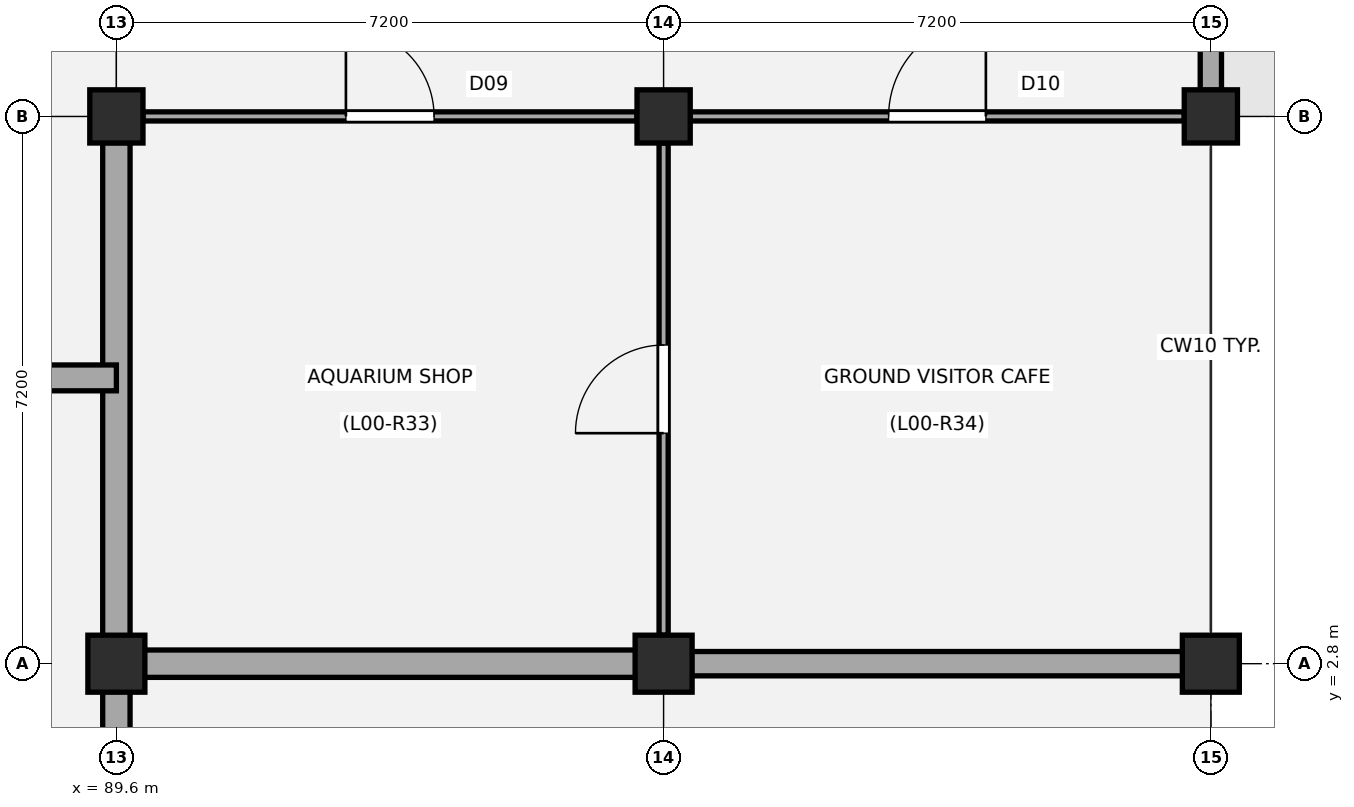
"""IFC4 building model, lengths in metres.
Left out: names, types, materials, properties, quantities, classifications, styles, units other than length and angle.
Written with IfcOpenShell. Run it as: python <this file> out.ifc"""

import sys

from ifc_helpers import new_model, si_unit, direction, frame, frame_2d, origin, origin_2d, place, context, subcontext, project, spatial, rectangle, circle, extrude, element, fill, save


model = new_model("IFC4")
c1 = context("Model", 3, precision=1e-05, world=origin(), true_north=direction((0.0, 1.0)))
c2 = subcontext(c1, "Body", "Model", "MODEL_VIEW")
j1 = project(units=[si_unit("LENGTHUNIT", "METRE"), si_unit("PLANEANGLEUNIT", "RADIAN")], contexts=[c1])
p1 = place(None, origin())
s1 = spatial("IfcSite", under=j1, at=p1, CompositionType="ELEMENT")
p2 = place(p1, origin())
s2 = spatial("IfcBuilding", under=s1, at=p2, CompositionType="ELEMENT")
p3 = place(p2, origin())
s3 = spatial("IfcBuildingStorey", under=s2, at=p3, CompositionType="ELEMENT", Elevation=0.0)
p4 = place(p3, frame((89.6, 2.8, -0.35), z_axis=(0.0, 0.0, 1.0), x_axis=(1.0, 0.0, 0.0)))
e1 = element("IfcColumn", 1, at=p4, inside=s3, PredefinedType="COLUMN", context=c2, shape_type="SweptSolid", body=[
    extrude(circle(Radius=0.375, at=origin_2d()), origin(), (0.0, 0.0, 1.0), 5.03),
])
p5 = place(p3, frame((89.6, 10.0, -0.35), z_axis=(0.0, 0.0, 1.0), x_axis=(1.0, 0.0, 0.0)))
e2 = element("IfcColumn", 2, at=p5, inside=s3, PredefinedType="COLUMN", context=c2, shape_type="SweptSolid", body=[
    extrude(rectangle(XDim=0.7, YDim=0.7, at=origin_2d()), origin(), (0.0, 0.0, 1.0), 5.03),
])
p6 = place(p3, frame((96.8, 2.8, -0.35), z_axis=(0.0, 0.0, 1.0), x_axis=(1.0, 0.0, 0.0)))
e3 = element("IfcColumn", 3, at=p6, inside=s3, PredefinedType="COLUMN", context=c2, shape_type="SweptSolid", body=[
    extrude(circle(Radius=0.375, at=origin_2d()), origin(), (0.0, 0.0, 1.0), 5.03),
])
p7 = place(p3, frame((96.8, 10.0, -0.35), z_axis=(0.0, 0.0, 1.0), x_axis=(1.0, 0.0, 0.0)))
e4 = element("IfcColumn", 4, at=p7, inside=s3, PredefinedType="COLUMN", context=c2, shape_type="SweptSolid", body=[
    extrude(rectangle(XDim=0.7, YDim=0.7, at=origin_2d()), origin(), (0.0, 0.0, 1.0), 5.03),
])
p8 = place(p3, frame((104.0, 2.8, -0.35), z_axis=(0.0, 0.0, 1.0), x_axis=(1.0, 0.0, 0.0)))
e5 = element("IfcColumn", 5, at=p8, inside=s3, PredefinedType="COLUMN", context=c2, shape_type="SweptSolid", body=[
    extrude(circle(Radius=0.375, at=origin_2d()), origin(), (0.0, 0.0, 1.0), 5.03),
])
p9 = place(p3, frame((104.0, 10.0, -0.35), z_axis=(0.0, 0.0, 1.0), x_axis=(1.0, 0.0, 0.0)))
e6 = element("IfcColumn", 6, at=p9, inside=s3, PredefinedType="COLUMN", context=c2, shape_type="SweptSolid", body=[
    extrude(rectangle(XDim=0.7, YDim=0.7, at=origin_2d()), origin(), (0.0, 0.0, 1.0), 5.03),
])
p10 = place(p3, frame((96.49, 2.8, 0.0), z_axis=(0.0, 0.0, 1.0), x_axis=(-1.0, 0.0, 0.0)))
e7 = element("IfcWall", 7, at=p10, inside=s3, PredefinedType="STANDARD", context=c2, shape_type="SweptSolid", body=[
    extrude(rectangle(XDim=6.58, YDim=0.36, at=frame_2d((3.29, 0.0))), origin(), (0.0, 0.0, 1.0), 3.67),
])
p11 = place(p3, frame((103.69, 2.8, 0.0), z_axis=(0.0, 0.0, 1.0), x_axis=(-1.0, 0.0, 0.0)))
e8 = element("IfcWall", 8, at=p11, inside=s3, PredefinedType="STANDARD", context=c2, shape_type="SweptSolid", body=[
    extrude(rectangle(XDim=6.58, YDim=0.32, at=frame_2d((3.29, 0.0))), origin(), (0.0, 0.0, 1.0), 3.67),
])
p12 = place(p3, frame((104.0, 16.855, 0.0), z_axis=(0.0, 0.0, 1.0), x_axis=(0.0, -1.0, 0.0)))
e9 = element("IfcWall", 9, at=p12, inside=s3, PredefinedType="STANDARD", context=c2, shape_type="SweptSolid", body=[
    extrude(rectangle(XDim=6.51, YDim=0.28, at=frame_2d((3.255, 0.0))), origin(), (0.0, 0.0, 1.0), 3.67),
])
p13 = place(p12, frame((2.235, 0.0, 0.0)))
e10 = element("IfcOpeningElement", 10, at=p13, cuts=e9, PredefinedType="OPENING", context=c2, shape_type="SweptSolid", body=[
    extrude(rectangle(XDim=2.04, YDim=2.32, at=frame_2d((1.02, 1.16))), frame((0.0, 0.15, 0.0), z_axis=(0.0, -1.0, 0.0), x_axis=(1.0, 0.0, 0.0)), (0.0, 0.0, 1.0), 0.3),
])
p14 = place(p3, frame((89.6, 1.56, 0.0), z_axis=(0.0, 0.0, 1.0), x_axis=(0.0, 1.0, 0.0)))
e11 = element("IfcWall", 11, at=p14, inside=s3, PredefinedType="STANDARD", context=c2, shape_type="SweptSolid", body=[
    extrude(rectangle(XDim=8.095, YDim=0.36, at=frame_2d((4.047, 0.0))), origin(), (0.0, 0.0, 1.0), 3.67),
])
p15 = place(p3, frame((88.2, 6.56, 0.0), z_axis=(0.0, 0.0, 1.0), x_axis=(1.0, 0.0, 0.0)))
e12 = element("IfcWall", 12, at=p15, inside=s3, PredefinedType="STANDARD", context=c2, shape_type="SweptSolid", body=[
    extrude(rectangle(XDim=1.4, YDim=0.34, at=frame_2d((0.7, 0.0))), origin(), (0.0, 0.0, 1.0), 8.87),
])
p16 = place(p3, frame((96.8, 3.175, 0.0), z_axis=(0.0, 0.0, 1.0), x_axis=(0.0, 1.0, 0.0)))
e13 = element("IfcWall", 13, at=p16, inside=s3, PredefinedType="PARTITIONING", context=c2, shape_type="SweptSolid", body=[
    extrude(rectangle(XDim=6.475, YDim=0.12, at=frame_2d((3.237, 0.0))), origin(), (0.0, 0.0, 1.0), 3.62),
])
p17 = place(p16, frame((2.657, 0.0, 0.0)))
e14 = element("IfcOpeningElement", 14, at=p17, cuts=e13, PredefinedType="OPENING", context=c2, shape_type="SweptSolid", body=[
    extrude(rectangle(XDim=1.16, YDim=2.18, at=frame_2d((0.58, 1.09))), frame((0.0, 0.07, 0.0), z_axis=(0.0, -1.0, 0.0), x_axis=(1.0, 0.0, 0.0)), (0.0, 0.0, 1.0), 0.14),
])
p18 = place(p3, frame((89.95, 10.0, 0.0), z_axis=(0.0, 0.0, 1.0), x_axis=(1.0, 0.0, 0.0)))
e15 = element("IfcWall", 15, at=p18, inside=s3, PredefinedType="PARTITIONING", context=c2, shape_type="SweptSolid", body=[
    extrude(rectangle(XDim=6.5, YDim=0.12, at=frame_2d((3.25, 0.0))), origin(), (0.0, 0.0, 1.0), 3.62),
])
p19 = place(p18, frame((2.67, 0.0, 0.0)))
e16 = element("IfcOpeningElement", 16, at=p19, cuts=e15, PredefinedType="OPENING", context=c2, shape_type="SweptSolid", body=[
    extrude(rectangle(XDim=1.16, YDim=2.18, at=frame_2d((0.58, 1.09))), frame((0.0, 0.07, 0.0), z_axis=(0.0, -1.0, 0.0), x_axis=(1.0, 0.0, 0.0)), (0.0, 0.0, 1.0), 0.14),
])
p20 = place(p3, frame((97.15, 10.0, 0.0), z_axis=(0.0, 0.0, 1.0), x_axis=(1.0, 0.0, 0.0)))
e17 = element("IfcWall", 17, at=p20, inside=s3, PredefinedType="PARTITIONING", context=c2, shape_type="SweptSolid", body=[
    extrude(rectangle(XDim=6.5, YDim=0.12, at=frame_2d((3.25, 0.0))), origin(), (0.0, 0.0, 1.0), 3.52),
])
p21 = place(p20, frame((2.61, 0.0, 0.0)))
e18 = element("IfcOpeningElement", 18, at=p21, cuts=e17, PredefinedType="OPENING", context=c2, shape_type="SweptSolid", body=[
    extrude(rectangle(XDim=1.28, YDim=2.2, at=frame_2d((0.64, 1.1))), frame((0.0, 0.07, 0.0), z_axis=(0.0, -1.0, 0.0), x_axis=(1.0, 0.0, 0.0)), (0.0, 0.0, 1.0), 0.14),
])
p22 = place(p19, origin())
e19 = element("IfcDoor", 19, at=p22, inside=s3, OperationType="SINGLE_SWING_LEFT", PredefinedType="DOOR", context=c2, shape_type="SweptSolid", body=[
    extrude(rectangle(XDim=1.16, YDim=2.18, at=frame_2d((0.58, 1.09))), frame((0.0, 0.025, 0.0), z_axis=(0.0, -1.0, 0.0), x_axis=(1.0, 0.0, 0.0)), (0.0, 0.0, 1.0), 0.05),
])
fill(e16, e19)
p23 = place(p21, origin())
e20 = element("IfcDoor", 20, at=p23, inside=s3, OperationType="SINGLE_SWING_RIGHT", PredefinedType="DOOR", context=c2, shape_type="SweptSolid", body=[
    extrude(rectangle(XDim=1.28, YDim=2.2, at=frame_2d((0.64, 1.1))), frame((0.0, 0.025, 0.0), z_axis=(0.0, -1.0, 0.0), x_axis=(1.0, 0.0, 0.0)), (0.0, 0.0, 1.0), 0.05),
])
fill(e18, e20)
p24 = place(p17, origin())
e21 = element("IfcDoor", 21, at=p24, inside=s3, OperationType="SINGLE_SWING_LEFT", PredefinedType="DOOR", context=c2, shape_type="SweptSolid", body=[
    extrude(rectangle(XDim=1.16, YDim=2.18, at=frame_2d((0.58, 1.09))), frame((0.0, 0.025, 0.0), z_axis=(0.0, -1.0, 0.0), x_axis=(1.0, 0.0, 0.0)), (0.0, 0.0, 1.0), 0.05),
])
fill(e14, e21)
save(model, sys.argv[1])
